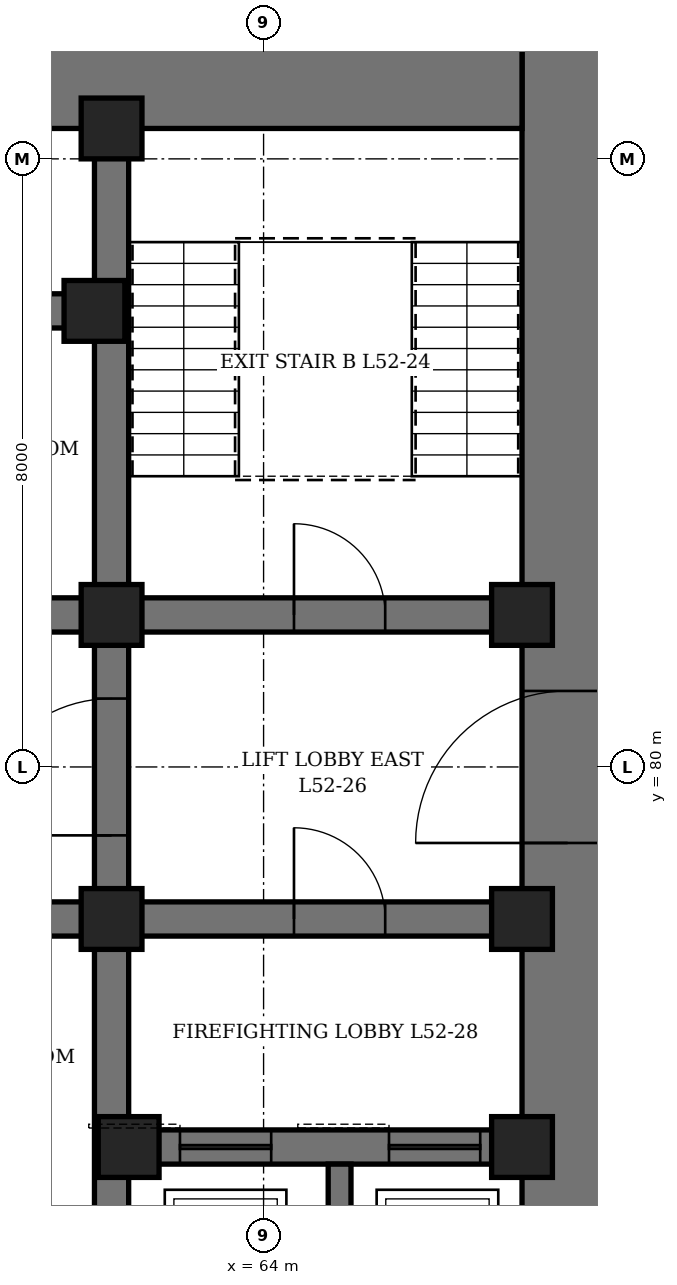
"""IFC4 building model, lengths in metres.
Left out: names, types, materials, properties, quantities, classifications, styles, units other than length and angle.
Written with IfcOpenShell. Run it as: python <this file> out.ifc"""

import sys

from ifc_helpers import new_model, si_unit, direction, frame, frame_2d, origin, origin_2d, place, context, subcontext, project, spatial, rectangle, hollow_rectangle, extrude, element, fill, save


model = new_model("IFC4")
c1 = context("Model", 3, precision=1e-05, world=origin(), true_north=direction((0.0, 1.0)))
c2 = subcontext(c1, "Body", "Model", "MODEL_VIEW")
j1 = project(units=[si_unit("LENGTHUNIT", "METRE"), si_unit("PLANEANGLEUNIT", "RADIAN")], contexts=[c1])
p1 = place(None, origin())
s1 = spatial("IfcSite", under=j1, at=p1, CompositionType="ELEMENT")
p2 = place(p1, origin())
s2 = spatial("IfcBuilding", under=s1, at=p2, CompositionType="ELEMENT")
p3 = place(p2, frame((0.0, 0.0, 231.7)))
s3 = spatial("IfcBuildingStorey", under=s2, at=p3, CompositionType="ELEMENT", Elevation=231.7)
p4 = place(p3, frame((68.0, 70.4, 0.0), z_axis=(0.0, 0.0, 1.0), x_axis=(0.0, 1.0, 0.0)))
e1 = element("IfcWall", 1, at=p4, inside=s3, PredefinedType="SHEAR", context=c2, shape_type="SweptSolid", body=[
    extrude(rectangle(XDim=19.2, YDim=1.2, at=frame_2d((9.6, 0.0))), origin(), (0.0, 0.0, 1.0), 4.2),
])
p5 = place(p4, frame((8.6, 0.0, 0.0)))
e2 = element("IfcOpeningElement", 2, at=p5, cuts=e1, PredefinedType="OPENING", context=c2, shape_type="SweptSolid", body=[
    extrude(rectangle(XDim=2.0, YDim=2.4, at=frame_2d((1.0, 1.2))), frame((0.0, 0.61, 0.0), z_axis=(0.0, -1.0, 0.0), x_axis=(1.0, 0.0, 0.0)), (0.0, 0.0, 1.0), 1.22),
])
p6 = place(p3, frame((44.6, 89.0, 0.0), z_axis=(0.0, 0.0, 1.0), x_axis=(1.0, 0.0, 0.0)))
e3 = element("IfcWall", 3, at=p6, inside=s3, PredefinedType="SHEAR", context=c2, shape_type="SweptSolid", body=[
    extrude(rectangle(XDim=22.8, YDim=1.2, at=frame_2d((11.4, 0.0))), origin(), (0.0, 0.0, 1.0), 4.2),
])
p7 = place(p6, frame((7.9, 0.0, 0.0)))
e4 = element("IfcOpeningElement", 4, at=p7, cuts=e3, PredefinedType="OPENING", context=c2, shape_type="SweptSolid", body=[
    extrude(rectangle(XDim=1.0, YDim=2.1, at=frame_2d((0.5, 1.05))), frame((0.0, 0.61, 0.0), z_axis=(0.0, -1.0, 0.0), x_axis=(1.0, 0.0, 0.0)), (0.0, 0.0, 1.0), 1.22),
])
p8 = place(p6, frame((13.012, 0.0, 0.0)))
e5 = element("IfcOpeningElement", 5, at=p8, cuts=e3, PredefinedType="OPENING", context=c2, shape_type="SweptSolid", body=[
    extrude(rectangle(XDim=0.9, YDim=2.1, at=frame_2d((0.45, 1.05))), frame((0.0, 0.61, 0.0), z_axis=(0.0, -1.0, 0.0), x_axis=(1.0, 0.0, 0.0)), (0.0, 0.0, 1.0), 1.22),
])
p9 = place(p3, frame((62.0, 71.6, 0.0), z_axis=(0.0, 0.0, 1.0), x_axis=(0.0, 1.0, 0.0)))
e6 = element("IfcWall", 6, at=p9, inside=s3, PredefinedType="SHEAR", context=c2, shape_type="SweptSolid", body=[
    extrude(rectangle(XDim=16.8, YDim=0.45, at=frame_2d((8.4, 0.0))), origin(), (0.0, 0.0, 1.0), 4.2),
])
p10 = place(p9, frame((7.5, 0.0, 0.0)))
e7 = element("IfcOpeningElement", 7, at=p10, cuts=e6, PredefinedType="OPENING", context=c2, shape_type="SweptSolid", body=[
    extrude(rectangle(XDim=1.8, YDim=2.4, at=frame_2d((0.9, 1.2))), frame((0.0, 0.235, 0.0), z_axis=(0.0, -1.0, 0.0), x_axis=(1.0, 0.0, 0.0)), (0.0, 0.0, 1.0), 0.47),
])
p11 = place(p3, frame((62.225, 75.0, 0.0), z_axis=(0.0, 0.0, 1.0), x_axis=(1.0, 0.0, 0.0)))
e8 = element("IfcWall", 8, at=p11, inside=s3, PredefinedType="SHEAR", context=c2, shape_type="SweptSolid", body=[
    extrude(rectangle(XDim=5.175, YDim=0.45, at=frame_2d((2.587, 0.0))), origin(), (0.0, 0.0, 1.0), 4.2),
])
p12 = place(p11, frame((0.675, 0.0, 0.0)))
e9 = element("IfcOpeningElement", 9, at=p12, cuts=e8, PredefinedType="OPENING", context=c2, shape_type="SweptSolid", body=[
    extrude(rectangle(XDim=1.2, YDim=2.2, at=frame_2d((0.6, 1.1))), frame((0.0, 0.235, 0.0), z_axis=(0.0, -1.0, 0.0), x_axis=(1.0, 0.0, 0.0)), (0.0, 0.0, 1.0), 0.47),
])
p13 = place(p11, frame((3.425, 0.0, 0.0)))
e10 = element("IfcOpeningElement", 10, at=p13, cuts=e8, PredefinedType="OPENING", context=c2, shape_type="SweptSolid", body=[
    extrude(rectangle(XDim=1.2, YDim=2.2, at=frame_2d((0.6, 1.1))), frame((0.0, 0.235, 0.0), z_axis=(0.0, -1.0, 0.0), x_axis=(1.0, 0.0, 0.0)), (0.0, 0.0, 1.0), 0.47),
])
p14 = place(p3, frame((62.225, 78.0, 0.0), z_axis=(0.0, 0.0, 1.0), x_axis=(1.0, 0.0, 0.0)))
e11 = element("IfcWall", 11, at=p14, inside=s3, PredefinedType="SHEAR", context=c2, shape_type="SweptSolid", body=[
    extrude(rectangle(XDim=5.175, YDim=0.45, at=frame_2d((2.587, 0.0))), origin(), (0.0, 0.0, 1.0), 4.2),
])
p15 = place(p14, frame((2.175, 0.0, 0.0)))
e12 = element("IfcOpeningElement", 12, at=p15, cuts=e11, PredefinedType="OPENING", context=c2, shape_type="SweptSolid", body=[
    extrude(rectangle(XDim=1.2, YDim=2.1, at=frame_2d((0.6, 1.05))), frame((0.0, 0.235, 0.0), z_axis=(0.0, -1.0, 0.0), x_axis=(1.0, 0.0, 0.0)), (0.0, 0.0, 1.0), 0.47),
])
p16 = place(p3, frame((62.225, 82.0, 0.0), z_axis=(0.0, 0.0, 1.0), x_axis=(1.0, 0.0, 0.0)))
e13 = element("IfcWall", 13, at=p16, inside=s3, PredefinedType="SHEAR", context=c2, shape_type="SweptSolid", body=[
    extrude(rectangle(XDim=5.175, YDim=0.45, at=frame_2d((2.587, 0.0))), origin(), (0.0, 0.0, 1.0), 4.2),
])
p17 = place(p16, frame((2.175, 0.0, 0.0)))
e14 = element("IfcOpeningElement", 14, at=p17, cuts=e13, PredefinedType="OPENING", context=c2, shape_type="SweptSolid", body=[
    extrude(rectangle(XDim=1.2, YDim=2.1, at=frame_2d((0.6, 1.05))), frame((0.0, 0.235, 0.0), z_axis=(0.0, -1.0, 0.0), x_axis=(1.0, 0.0, 0.0)), (0.0, 0.0, 1.0), 0.47),
])
p18 = place(p3, frame((50.225, 78.0, 0.0), z_axis=(0.0, 0.0, 1.0), x_axis=(1.0, 0.0, 0.0)))
e15 = element("IfcWall", 15, at=p18, inside=s3, PredefinedType="SHEAR", context=c2, shape_type="SweptSolid", body=[
    extrude(rectangle(XDim=11.55, YDim=0.45, at=frame_2d((5.775, 0.0))), origin(), (0.0, 0.0, 1.0), 4.2),
])
p19 = place(p18, frame((0.825, 0.0, 0.0)))
e16 = element("IfcOpeningElement", 16, at=p19, cuts=e15, PredefinedType="OPENING", context=c2, shape_type="SweptSolid", body=[
    extrude(rectangle(XDim=0.9, YDim=2.1, at=frame_2d((0.45, 1.05))), frame((0.0, 0.235, 0.0), z_axis=(0.0, -1.0, 0.0), x_axis=(1.0, 0.0, 0.0)), (0.0, 0.0, 1.0), 0.47),
])
p20 = place(p18, frame((3.825, 0.0, 0.0)))
e17 = element("IfcOpeningElement", 17, at=p20, cuts=e15, PredefinedType="OPENING", context=c2, shape_type="SweptSolid", body=[
    extrude(rectangle(XDim=0.9, YDim=2.1, at=frame_2d((0.45, 1.05))), frame((0.0, 0.235, 0.0), z_axis=(0.0, -1.0, 0.0), x_axis=(1.0, 0.0, 0.0)), (0.0, 0.0, 1.0), 0.47),
])
p21 = place(p18, frame((6.825, 0.0, 0.0)))
e18 = element("IfcOpeningElement", 18, at=p21, cuts=e15, PredefinedType="OPENING", context=c2, shape_type="SweptSolid", body=[
    extrude(rectangle(XDim=0.9, YDim=2.1, at=frame_2d((0.45, 1.05))), frame((0.0, 0.235, 0.0), z_axis=(0.0, -1.0, 0.0), x_axis=(1.0, 0.0, 0.0)), (0.0, 0.0, 1.0), 0.47),
])
p22 = place(p18, frame((9.825, 0.0, 0.0)))
e19 = element("IfcOpeningElement", 19, at=p22, cuts=e15, PredefinedType="OPENING", context=c2, shape_type="SweptSolid", body=[
    extrude(rectangle(XDim=0.9, YDim=2.1, at=frame_2d((0.45, 1.05))), frame((0.0, 0.235, 0.0), z_axis=(0.0, -1.0, 0.0), x_axis=(1.0, 0.0, 0.0)), (0.0, 0.0, 1.0), 0.47),
])
p23 = place(p3, frame((50.225, 82.0, 0.0), z_axis=(0.0, 0.0, 1.0), x_axis=(1.0, 0.0, 0.0)))
e20 = element("IfcWall", 20, at=p23, inside=s3, PredefinedType="SHEAR", context=c2, shape_type="SweptSolid", body=[
    extrude(rectangle(XDim=11.55, YDim=0.45, at=frame_2d((5.775, 0.0))), origin(), (0.0, 0.0, 1.0), 4.2),
])
p24 = place(p23, frame((0.825, 0.0, 0.0)))
e21 = element("IfcOpeningElement", 21, at=p24, cuts=e20, PredefinedType="OPENING", context=c2, shape_type="SweptSolid", body=[
    extrude(rectangle(XDim=0.9, YDim=2.1, at=frame_2d((0.45, 1.05))), frame((0.0, 0.235, 0.0), z_axis=(0.0, -1.0, 0.0), x_axis=(1.0, 0.0, 0.0)), (0.0, 0.0, 1.0), 0.47),
])
p25 = place(p23, frame((3.825, 0.0, 0.0)))
e22 = element("IfcOpeningElement", 22, at=p25, cuts=e20, PredefinedType="OPENING", context=c2, shape_type="SweptSolid", body=[
    extrude(rectangle(XDim=0.9, YDim=2.1, at=frame_2d((0.45, 1.05))), frame((0.0, 0.235, 0.0), z_axis=(0.0, -1.0, 0.0), x_axis=(1.0, 0.0, 0.0)), (0.0, 0.0, 1.0), 0.47),
])
p26 = place(p23, frame((6.825, 0.0, 0.0)))
e23 = element("IfcOpeningElement", 23, at=p26, cuts=e20, PredefinedType="OPENING", context=c2, shape_type="SweptSolid", body=[
    extrude(rectangle(XDim=0.9, YDim=2.1, at=frame_2d((0.45, 1.05))), frame((0.0, 0.235, 0.0), z_axis=(0.0, -1.0, 0.0), x_axis=(1.0, 0.0, 0.0)), (0.0, 0.0, 1.0), 0.47),
])
p27 = place(p23, frame((9.825, 0.0, 0.0)))
e24 = element("IfcOpeningElement", 24, at=p27, cuts=e20, PredefinedType="OPENING", context=c2, shape_type="SweptSolid", body=[
    extrude(rectangle(XDim=0.9, YDim=2.1, at=frame_2d((0.45, 1.05))), frame((0.0, 0.235, 0.0), z_axis=(0.0, -1.0, 0.0), x_axis=(1.0, 0.0, 0.0)), (0.0, 0.0, 1.0), 0.47),
])
p28 = place(p3, frame((50.225, 86.0, 0.0), z_axis=(0.0, 0.0, 1.0), x_axis=(1.0, 0.0, 0.0)))
e25 = element("IfcWall", 25, at=p28, inside=s3, PredefinedType="SHEAR", context=c2, shape_type="SweptSolid", body=[
    extrude(rectangle(XDim=11.55, YDim=0.45, at=frame_2d((5.775, 0.0))), origin(), (0.0, 0.0, 1.0), 4.2),
])
p29 = place(p3, frame((65.0, 71.6, 0.0), z_axis=(0.0, 0.0, 1.0), x_axis=(0.0, 1.0, 0.0)))
e26 = element("IfcWall", 26, at=p29, inside=s3, PredefinedType="SHEAR", context=c2, shape_type="SweptSolid", body=[
    extrude(rectangle(XDim=3.175, YDim=0.3, at=frame_2d((1.587, 0.0))), origin(), (0.0, 0.0, 1.0), 4.2),
])
for number, where, z_axis, x_axis in (
    (27, (61.775, 86.0, 0.0), (0.0, 0.0, 1.0), (1.0, 0.0, 0.0)),
    (28, (62.0, 78.0, 0.0), (0.0, 0.0, 1.0), (1.0, 0.0, 0.0)),
    (29, (62.0, 82.0, 0.0), (0.0, 0.0, 1.0), (1.0, 0.0, 0.0)),
    (30, (62.0, 88.4, 0.0), (0.0, 0.0, 1.0), (1.0, 0.0, 0.0)),
    (31, (62.225, 75.0, 0.0), (0.0, 0.0, 1.0), (1.0, 0.0, 0.0)),
    (32, (67.4, 75.0, 0.0), (0.0, 0.0, 1.0), (1.0, 0.0, 0.0)),
    (33, (67.4, 78.0, 0.0), (0.0, 0.0, 1.0), (1.0, 0.0, 0.0)),
    (34, (67.4, 82.0, 0.0), (0.0, 0.0, 1.0), (1.0, 0.0, 0.0)),
):
    element("IfcColumn", number, at=place(p3, frame(where, z_axis=z_axis, x_axis=x_axis)), inside=s3, PredefinedType="COLUMN", context=c2, shape_type="SweptSolid", body=[
        extrude(hollow_rectangle(XDim=0.8, YDim=0.8, WallThickness=0.1, at=origin_2d()), origin(), (0.0, 0.0, 1.0), 4.2),
    ])
p30 = place(p17, origin())
e35 = element("IfcDoor", 35, at=p30, inside=s3, OperationType="SINGLE_SWING_LEFT", PredefinedType="DOOR", context=c2, shape_type="SweptSolid", body=[
    extrude(rectangle(XDim=1.2, YDim=2.1, at=frame_2d((0.6, 1.05))), frame((0.0, 0.225, 0.0), z_axis=(0.0, -1.0, 0.0), x_axis=(1.0, 0.0, 0.0)), (0.0, 0.0, 1.0), 0.449),
])
fill(e14, e35)
p31 = place(p5, origin())
e36 = element("IfcDoor", 36, at=p31, inside=s3, OperationType="DOUBLE_DOOR_SINGLE_SWING", PredefinedType="DOOR", context=c2, shape_type="SweptSolid", body=[
    extrude(rectangle(XDim=2.0, YDim=2.4, at=frame_2d((1.0, 1.2))), frame((0.0, 0.35, 0.0), z_axis=(0.0, -1.0, 0.0), x_axis=(1.0, 0.0, 0.0)), (0.0, 0.0, 1.0), 0.7),
])
fill(e2, e36)
p32 = place(p10, origin())
e37 = element("IfcDoor", 37, at=p32, inside=s3, OperationType="DOUBLE_DOOR_SINGLE_SWING", PredefinedType="DOOR", context=c2, shape_type="SweptSolid", body=[
    extrude(rectangle(XDim=1.8, YDim=2.4, at=frame_2d((0.9, 1.2))), frame((0.0, 0.225, 0.0), z_axis=(0.0, -1.0, 0.0), x_axis=(1.0, 0.0, 0.0)), (0.0, 0.0, 1.0), 0.449),
])
fill(e7, e37)
p33 = place(p15, origin())
e38 = element("IfcDoor", 38, at=p33, inside=s3, OperationType="SINGLE_SWING_RIGHT", PredefinedType="DOOR", context=c2, shape_type="SweptSolid", body=[
    extrude(rectangle(XDim=1.2, YDim=2.1, at=frame_2d((0.6, 1.05))), frame((0.0, 0.225, 0.0), z_axis=(0.0, -1.0, 0.0), x_axis=(1.0, 0.0, 0.0)), (0.0, 0.0, 1.0), 0.449),
])
fill(e12, e38)
p34 = place(p12, origin())
e39 = element("IfcDoor", 39, at=p34, inside=s3, OperationType="SLIDING_TO_LEFT", PredefinedType="DOOR", context=c2, shape_type="SweptSolid", body=[
    extrude(rectangle(XDim=1.2, YDim=2.2, at=frame_2d((0.6, 1.1))), frame((0.0, 0.225, 0.0), z_axis=(0.0, -1.0, 0.0), x_axis=(1.0, 0.0, 0.0)), (0.0, 0.0, 1.0), 0.449),
])
fill(e9, e39)
p35 = place(p13, origin())
e40 = element("IfcDoor", 40, at=p35, inside=s3, OperationType="SLIDING_TO_LEFT", PredefinedType="DOOR", context=c2, shape_type="SweptSolid", body=[
    extrude(rectangle(XDim=1.2, YDim=2.2, at=frame_2d((0.6, 1.1))), frame((0.0, 0.225, 0.0), z_axis=(0.0, -1.0, 0.0), x_axis=(1.0, 0.0, 0.0)), (0.0, 0.0, 1.0), 0.449),
])
fill(e10, e40)
save(model, sys.argv[1])
